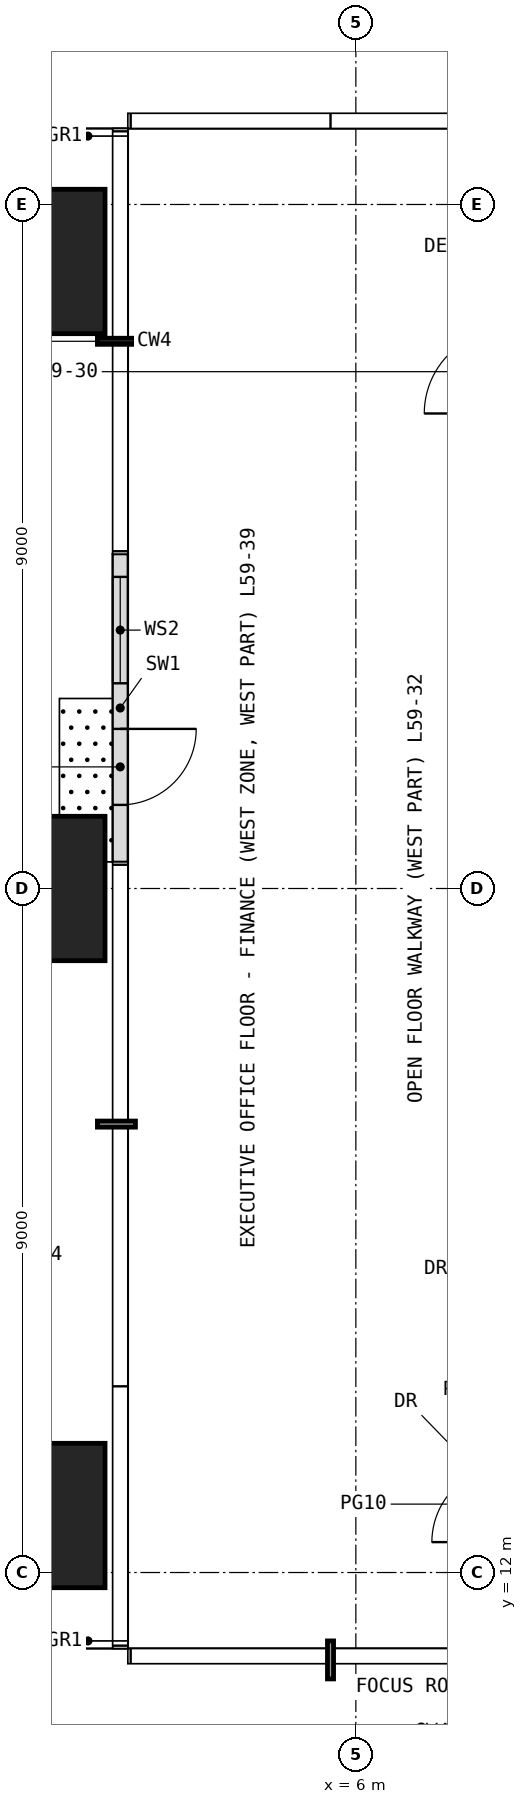
"""IFC4 building model, lengths in metres.
Left out: names, types, materials, properties, quantities, classifications, styles, units other than length and angle.
Written with IfcOpenShell. Run it as: python <this file> out.ifc"""

import sys

from ifc_helpers import new_model, si_unit, direction, frame, frame_2d, origin, origin_2d, place, context, subcontext, project, spatial, rectangle, extrude, element, fill, save


model = new_model("IFC4")
c1 = context("Model", 3, precision=1e-05, world=origin(), true_north=direction((0.0, 1.0)))
c2 = subcontext(c1, "Body", "Model", "MODEL_VIEW")
j1 = project(units=[si_unit("LENGTHUNIT", "METRE"), si_unit("PLANEANGLEUNIT", "RADIAN")], contexts=[c1])
p1 = place(None, origin())
s1 = spatial("IfcSite", under=j1, at=p1, CompositionType="ELEMENT")
p2 = place(p1, origin())
s2 = spatial("IfcBuilding", under=s1, at=p2, CompositionType="ELEMENT")
p3 = place(p2, frame((0.0, 0.0, 248.2)))
s3 = spatial("IfcBuildingStorey", under=s2, at=p3, CompositionType="ELEMENT", Elevation=248.2)
for number, where, z_axis, x_axis in (
    (1, (1.75, 12.75, 0.0), (0.0, 0.0, 1.0), (1.0, 0.0, 0.0)),
    (2, (1.75, 21.0, 0.0), (0.0, 0.0, 1.0), (1.0, 0.0, 0.0)),
    (3, (1.75, 29.25, 0.0), (0.0, 0.0, 1.0), (1.0, 0.0, 0.0)),
):
    element("IfcColumn", number, at=place(p3, frame(where, z_axis=z_axis, x_axis=x_axis)), inside=s3, PredefinedType="COLUMN", context=c2, shape_type="SweptSolid", body=[
        extrude(rectangle(XDim=1.9, YDim=1.9, at=origin_2d()), origin(), (0.0, 0.0, 1.0), 4.2),
    ])
p4 = place(p3, frame((2.9, 25.4, 0.0), z_axis=(0.0, 0.0, 1.0), x_axis=(0.0, -1.0, 0.0)))
e4 = element("IfcWall", 4, at=p4, inside=s3, PredefinedType="USERDEFINED", context=c2, shape_type="SweptSolid", body=[
    extrude(rectangle(XDim=4.05, YDim=0.2, at=frame_2d((2.025, 0.0))), origin(), (0.0, 0.0, 1.0), 3.95),
])
p5 = place(p4, frame((2.3, 0.0, 0.0)))
e5 = element("IfcOpeningElement", 5, at=p5, cuts=e4, PredefinedType="OPENING", context=c2, shape_type="SweptSolid", body=[
    extrude(rectangle(XDim=1.0, YDim=2.4, at=frame_2d((0.5, 1.2))), frame((0.0, 0.11, 0.0), z_axis=(0.0, -1.0, 0.0), x_axis=(1.0, 0.0, 0.0)), (0.0, 0.0, 1.0), 0.22),
])
p6 = place(p4, frame((0.3, 0.0, 0.3)))
e6 = element("IfcOpeningElement", 6, at=p6, cuts=e4, PredefinedType="OPENING", context=c2, shape_type="SweptSolid", body=[
    extrude(rectangle(XDim=1.4, YDim=2.7, at=frame_2d((0.7, 1.35))), frame((0.0, 0.11, 0.0), z_axis=(0.0, -1.0, 0.0), x_axis=(1.0, 0.0, 0.0)), (0.0, 0.0, 1.0), 0.22),
])
p7 = place(p5, origin())
e7 = element("IfcDoor", 7, at=p7, inside=s3, OperationType="SINGLE_SWING_LEFT", PredefinedType="DOOR", context=c2, shape_type="SweptSolid", body=[
    extrude(rectangle(XDim=1.0, YDim=2.4, at=frame_2d((0.5, 1.2))), frame((0.0, 0.025, 0.0), z_axis=(0.0, -1.0, 0.0), x_axis=(1.0, 0.0, 0.0)), (0.0, 0.0, 1.0), 0.05),
])
fill(e5, e7)
p8 = place(p6, origin())
e8 = element("IfcWindow", 8, at=p8, inside=s3, PartitioningType="SINGLE_PANEL", PredefinedType="WINDOW", context=c2, shape_type="SweptSolid", body=[
    extrude(rectangle(XDim=1.4, YDim=2.7, at=frame_2d((0.7, 1.35))), frame((0.0, 0.03, 0.0), z_axis=(0.0, -1.0, 0.0), x_axis=(1.0, 0.0, 0.0)), (0.0, 0.0, 1.0), 0.06),
])
fill(e6, e8)
save(model, sys.argv[1])
